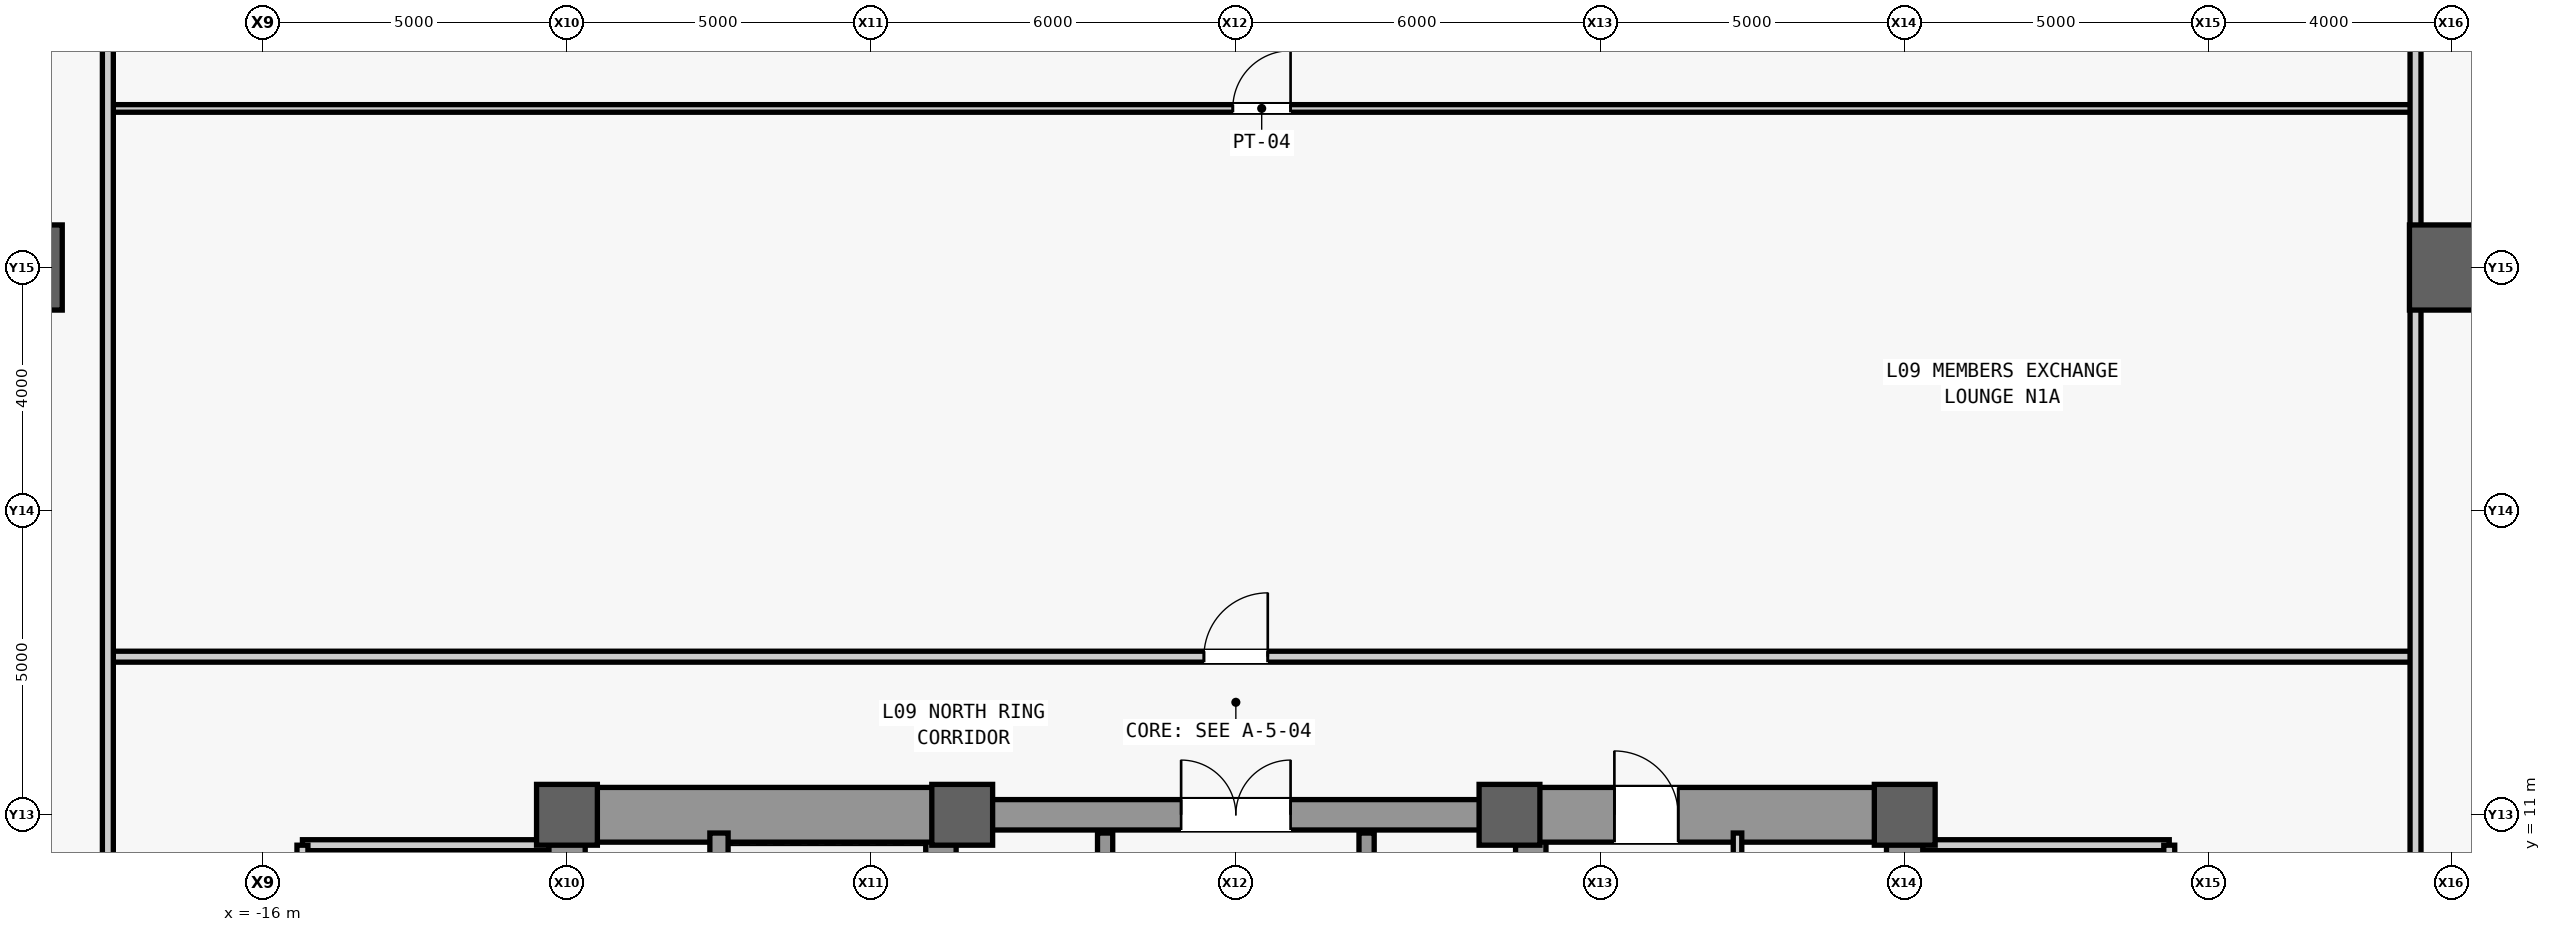
"""IFC4 building model, lengths in metres.
Left out: names, types, materials, properties, quantities, classifications, styles, units other than length and angle.
Written with IfcOpenShell. Run it as: python <this file> out.ifc"""

import sys

from ifc_helpers import new_model, si_unit, direction, frame, frame_2d, origin, origin_2d, place, context, subcontext, project, spatial, rectangle, hollow_rectangle, extrude, source, transform, mapped, element, fill, save


model = new_model("IFC4")
c1 = context("Model", 3, precision=1e-05, world=origin(), true_north=direction((0.0, 1.0)))
c2 = subcontext(c1, "Body", "Model", "MODEL_VIEW")
j1 = project(units=[si_unit("LENGTHUNIT", "METRE"), si_unit("PLANEANGLEUNIT", "RADIAN")], contexts=[c1])
p1 = place(None, origin())
s1 = spatial("IfcSite", under=j1, at=p1, CompositionType="ELEMENT")
p2 = place(p1, origin())
s2 = spatial("IfcBuilding", under=s1, at=p2, CompositionType="ELEMENT")
p3 = place(p2, frame((0.0, 0.0, 45.2)))
s3 = spatial("IfcBuildingStorey", under=s2, at=p3, CompositionType="ELEMENT", Elevation=45.2)
m1 = source(origin(), c2, "Body", "SweptSolid", [
    extrude(rectangle(XDim=22.0, YDim=0.6, at=frame_2d((11.0, 0.0))), origin(), (0.0, 0.0, 1.0), 3.94),
])
p4 = place(p3, frame((-11.0, -11.0, 0.0), z_axis=(0.0, 0.0, 1.0), x_axis=(0.0, 1.0, 0.0)))
e1 = element("IfcWall", 1, at=p4, inside=s3, PredefinedType="SHEAR", context=c2, shape_type="MappedRepresentation", body=[
    mapped(m1, transform((0.0, 0.0, 0.0), scale=1.0)),
])
m2 = source(origin(), c2, "Body", "SweptSolid", [
    extrude(rectangle(XDim=1.1, YDim=2.2, at=frame_2d((0.55, 1.1))), frame((0.0, 0.31, 0.0), z_axis=(0.0, -1.0, 0.0), x_axis=(1.0, 0.0, 0.0)), (0.0, 0.0, 1.0), 0.62),
])
p5 = place(p4, frame((0.8, 0.0, 0.0)))
e2 = element("IfcOpeningElement", 2, at=p5, cuts=e1, PredefinedType="OPENING", context=c2, shape_type="MappedRepresentation", body=[
    mapped(m2, transform((0.0, 0.0, 0.0), scale=1.0)),
])
p6 = place(p4, frame((12.5, 0.0, 0.0)))
e3 = element("IfcOpeningElement", 3, at=p6, cuts=e1, PredefinedType="OPENING", context=c2, shape_type="MappedRepresentation", body=[
    mapped(m2, transform((0.0, 0.0, 0.0), scale=1.0)),
])
m3 = source(origin(), c2, "Body", "SweptSolid", [
    extrude(rectangle(XDim=0.9, YDim=2.15, at=frame_2d((0.45, 1.075))), frame((0.0, 0.31, 0.0), z_axis=(0.0, -1.0, 0.0), x_axis=(1.0, 0.0, 0.0)), (0.0, 0.0, 1.0), 0.62),
])
p7 = place(p4, frame((6.2, 0.0, 0.0)))
e4 = element("IfcOpeningElement", 4, at=p7, cuts=e1, PredefinedType="OPENING", context=c2, shape_type="MappedRepresentation", body=[
    mapped(m3, transform((0.0, 0.0, 0.0), scale=1.0)),
])
p8 = place(p4, frame((8.05, 0.0, 0.0)))
e5 = element("IfcOpeningElement", 5, at=p8, cuts=e1, PredefinedType="OPENING", context=c2, shape_type="MappedRepresentation", body=[
    mapped(m3, transform((0.0, 0.0, 0.0), scale=1.0)),
])
m4 = source(origin(), c2, "Body", "SweptSolid", [
    extrude(rectangle(XDim=1.3, YDim=2.3, at=frame_2d((0.65, 1.15))), frame((0.0, 0.31, 0.0), z_axis=(0.0, -1.0, 0.0), x_axis=(1.0, 0.0, 0.0)), (0.0, 0.0, 1.0), 0.62),
])
p9 = place(p4, frame((2.7, 0.0, 0.0)))
e6 = element("IfcOpeningElement", 6, at=p9, cuts=e1, PredefinedType="OPENING", context=c2, shape_type="MappedRepresentation", body=[
    mapped(m4, transform((0.0, 0.0, 0.0), scale=1.0)),
])
p10 = place(p3, frame((11.0, -11.0, 0.0), z_axis=(0.0, 0.0, 1.0), x_axis=(0.0, 1.0, 0.0)))
e7 = element("IfcWall", 7, at=p10, inside=s3, PredefinedType="SHEAR", context=c2, shape_type="MappedRepresentation", body=[
    mapped(m1, transform((0.0, 0.0, 0.0), scale=1.0)),
])
p11 = place(p10, frame((0.8, 0.0, 0.0)))
e8 = element("IfcOpeningElement", 8, at=p11, cuts=e7, PredefinedType="OPENING", context=c2, shape_type="MappedRepresentation", body=[
    mapped(m2, transform((0.0, 0.0, 0.0), scale=1.0)),
])
p12 = place(p10, frame((6.85, 0.0, 0.0)))
e9 = element("IfcOpeningElement", 9, at=p12, cuts=e7, PredefinedType="OPENING", context=c2, shape_type="MappedRepresentation", body=[
    mapped(m3, transform((0.0, 0.0, 0.0), scale=1.0)),
])
p13 = place(p10, frame((2.7, 0.0, 0.0)))
e10 = element("IfcOpeningElement", 10, at=p13, cuts=e7, PredefinedType="OPENING", context=c2, shape_type="MappedRepresentation", body=[
    mapped(m4, transform((0.0, 0.0, 0.0), scale=1.0)),
])
p14 = place(p10, frame((13.35, 0.0, 0.0)))
e11 = element("IfcOpeningElement", 11, at=p14, cuts=e7, PredefinedType="OPENING", context=c2, shape_type="MappedRepresentation", body=[
    mapped(m4, transform((0.0, 0.0, 0.0), scale=1.0)),
])
m5 = source(origin(), c2, "Body", "SweptSolid", [
    extrude(rectangle(XDim=21.4, YDim=0.5, at=frame_2d((10.7, 0.0))), origin(), (0.0, 0.0, 1.0), 3.94),
])
for number, where, z_axis, x_axis in (
    (12, (-4.85, -10.7, 0.0), (0.0, 0.0, 1.0), (0.0, 1.0, 0.0)),
    (13, (4.85, -10.7, 0.0), (0.0, 0.0, 1.0), (0.0, 1.0, 0.0)),
):
    element("IfcWall", number, at=place(p3, frame(where, z_axis=z_axis, x_axis=x_axis)), inside=s3, PredefinedType="SHEAR", context=c2, shape_type="MappedRepresentation", body=[
        mapped(m5, transform((0.0, 0.0, 0.0), scale=1.0)),
    ])
m6 = source(origin(), c2, "Body", "SweptSolid", [
    extrude(rectangle(XDim=5.85, YDim=0.9, at=frame_2d((2.925, 0.0))), origin(), (0.0, 0.0, 1.0), 3.94),
])
p15 = place(p3, frame((-10.7, 11.0, 0.0), z_axis=(0.0, 0.0, 1.0), x_axis=(1.0, 0.0, 0.0)))
e14 = element("IfcWall", 14, at=p15, inside=s3, PredefinedType="SHEAR", context=c2, shape_type="MappedRepresentation", body=[
    mapped(m6, transform((0.0, 0.0, 0.0), scale=1.0)),
])
p16 = place(p3, frame((4.85, 11.0, 0.0), z_axis=(0.0, 0.0, 1.0), x_axis=(1.0, 0.0, 0.0)))
e15 = element("IfcWall", 15, at=p16, inside=s3, PredefinedType="SHEAR", context=c2, shape_type="MappedRepresentation", body=[
    mapped(m6, transform((0.0, 0.0, 0.0), scale=1.0)),
])
m7 = source(origin(), c2, "Body", "SweptSolid", [
    extrude(rectangle(XDim=1.05, YDim=2.2, at=frame_2d((0.525, 1.1))), frame((0.0, 0.46, 0.0), z_axis=(0.0, -1.0, 0.0), x_axis=(1.0, 0.0, 0.0)), (0.0, 0.0, 1.0), 0.92),
])
p17 = place(p16, frame((1.375, 0.0, 0.0)))
e16 = element("IfcOpeningElement", 16, at=p17, cuts=e15, PredefinedType="OPENING", context=c2, shape_type="MappedRepresentation", body=[
    mapped(m7, transform((0.0, 0.0, 0.0), scale=1.0)),
])
m8 = source(origin(), c2, "Body", "SweptSolid", [
    extrude(rectangle(XDim=9.2, YDim=0.5, at=frame_2d((4.6, 0.0))), origin(), (0.0, 0.0, 1.0), 3.94),
])
p18 = place(p3, frame((-4.6, 11.0, 0.0), z_axis=(0.0, 0.0, 1.0), x_axis=(1.0, 0.0, 0.0)))
e17 = element("IfcWall", 17, at=p18, inside=s3, PredefinedType="SHEAR", context=c2, shape_type="MappedRepresentation", body=[
    mapped(m8, transform((0.0, 0.0, 0.0), scale=1.0)),
])
m9 = source(origin(), c2, "Body", "SweptSolid", [
    extrude(rectangle(XDim=1.8, YDim=2.25, at=frame_2d((0.9, 1.125))), frame((0.0, 0.26, 0.0), z_axis=(0.0, -1.0, 0.0), x_axis=(1.0, 0.0, 0.0)), (0.0, 0.0, 1.0), 0.52),
])
p19 = place(p18, frame((3.7, 0.0, 0.0)))
e18 = element("IfcOpeningElement", 18, at=p19, cuts=e17, PredefinedType="OPENING", context=c2, shape_type="MappedRepresentation", body=[
    mapped(m9, transform((0.0, 0.0, 0.0), scale=1.0)),
])
m10 = source(origin(), c2, "Body", "SweptSolid", [
    extrude(hollow_rectangle(XDim=1.4, YDim=1.4, WallThickness=0.075, at=origin_2d()), origin(), (0.0, 0.0, 1.0), 4.2),
])
p20 = place(p3, frame((-20.0, 20.0, 0.0), z_axis=(0.0, 0.0, 1.0), x_axis=(1.0, 0.0, 0.0)))
e19 = element("IfcColumn", 19, at=p20, inside=s3, PredefinedType="COLUMN", context=c2, shape_type="MappedRepresentation", body=[
    mapped(m10, transform((0.0, 0.0, 0.0), scale=1.0)),
])
m11 = source(origin(), c2, "Body", "SweptSolid", [
    extrude(rectangle(XDim=1.0, YDim=1.0, at=origin_2d()), origin(), (0.0, 0.0, 1.0), 4.2),
])
for number, where, z_axis, x_axis in (
    (20, (-11.0, 11.0, 0.0), (0.0, 0.0, 1.0), (1.0, 0.0, 0.0)),
    (21, (-4.5, 11.0, 0.0), (0.0, 0.0, 1.0), (1.0, 0.0, 0.0)),
    (22, (4.5, 11.0, 0.0), (0.0, 0.0, 1.0), (1.0, 0.0, 0.0)),
    (23, (11.0, 11.0, 0.0), (0.0, 0.0, 1.0), (1.0, 0.0, 0.0)),
):
    element("IfcColumn", number, at=place(p3, frame(where, z_axis=z_axis, x_axis=x_axis)), inside=s3, PredefinedType="COLUMN", context=c2, shape_type="MappedRepresentation", body=[
        mapped(m11, transform((0.0, 0.0, 0.0), scale=1.0)),
    ])
p21 = place(p3, frame((20.0, 20.0, 0.0), z_axis=(0.0, 0.0, 1.0), x_axis=(1.0, 0.0, 0.0)))
e24 = element("IfcColumn", 24, at=p21, inside=s3, PredefinedType="COLUMN", context=c2, shape_type="MappedRepresentation", body=[
    mapped(m10, transform((0.0, 0.0, 0.0), scale=1.0)),
])
m12 = source(origin(), c2, "Body", "SweptSolid", [
    extrude(rectangle(XDim=7.75, YDim=0.3, at=frame_2d((3.875, 0.0))), origin(), (0.0, 0.0, 1.0), 3.94),
])
p22 = place(p3, frame((-8.5, 2.95, 0.0), z_axis=(0.0, 0.0, 1.0), x_axis=(0.0, 1.0, 0.0)))
e25 = element("IfcWall", 25, at=p22, inside=s3, PredefinedType="SHEAR", context=c2, shape_type="MappedRepresentation", body=[
    mapped(m12, transform((0.0, 0.0, 0.0), scale=1.0)),
])
m13 = source(origin(), c2, "Body", "SweptSolid", [
    extrude(rectangle(XDim=9.4, YDim=0.14, at=frame_2d((4.7, 0.0))), origin(), (0.0, 0.0, 1.0), 3.94),
])
p23 = place(p3, frame((8.25, 1.3, 0.0), z_axis=(0.0, 0.0, 1.0), x_axis=(0.0, 1.0, 0.0)))
e26 = element("IfcWall", 26, at=p23, inside=s3, PredefinedType="PARTITIONING", context=c2, shape_type="MappedRepresentation", body=[
    mapped(m13, transform((0.0, 0.0, 0.0), scale=1.0)),
])
m14 = source(origin(), c2, "Body", "SweptSolid", [
    extrude(rectangle(XDim=4.05, YDim=0.18, at=frame_2d((2.025, 0.0))), origin(), (0.0, 0.0, 1.0), 3.94),
])
p24 = place(p3, frame((-15.35, 10.5, 0.0), z_axis=(0.0, 0.0, 1.0), x_axis=(1.0, 0.0, 0.0)))
e27 = element("IfcWall", 27, at=p24, inside=s3, PredefinedType="PARTITIONING", context=c2, shape_type="MappedRepresentation", body=[
    mapped(m14, transform((0.0, 0.0, 0.0), scale=1.0)),
])
m15 = source(origin(), c2, "Body", "SweptSolid", [
    extrude(rectangle(XDim=16.6, YDim=0.18, at=frame_2d((8.3, 0.0))), origin(), (0.0, 0.0, 1.0), 3.94),
])
p25 = place(p3, frame((-15.35, -6.1, 0.0), z_axis=(0.0, 0.0, 1.0), x_axis=(0.0, 1.0, 0.0)))
e28 = element("IfcWall", 28, at=p25, inside=s3, PredefinedType="PARTITIONING", context=c2, shape_type="MappedRepresentation", body=[
    mapped(m15, transform((0.0, 0.0, 0.0), scale=1.0)),
])
m16 = source(origin(), c2, "Body", "SweptSolid", [
    extrude(rectangle(XDim=1.8, YDim=2.25, at=frame_2d((0.9, 1.125))), frame((0.0, 0.1, 0.0), z_axis=(0.0, -1.0, 0.0), x_axis=(1.0, 0.0, 0.0)), (0.0, 0.0, 1.0), 0.2),
])
p26 = place(p25, frame((2.7, 0.0, 0.0)))
e29 = element("IfcOpeningElement", 29, at=p26, cuts=e28, PredefinedType="OPENING", context=c2, shape_type="MappedRepresentation", body=[
    mapped(m16, transform((0.0, 0.0, 0.0), scale=1.0)),
])
p27 = place(p25, frame((11.0, 0.0, 0.0)))
e30 = element("IfcOpeningElement", 30, at=p27, cuts=e28, PredefinedType="OPENING", context=c2, shape_type="MappedRepresentation", body=[
    mapped(m16, transform((0.0, 0.0, 0.0), scale=1.0)),
])
p28 = place(p3, frame((11.3, 10.5, 0.0), z_axis=(0.0, 0.0, 1.0), x_axis=(1.0, 0.0, 0.0)))
e31 = element("IfcWall", 31, at=p28, inside=s3, PredefinedType="PARTITIONING", context=c2, shape_type="MappedRepresentation", body=[
    mapped(m14, transform((0.0, 0.0, 0.0), scale=1.0)),
])
p29 = place(p3, frame((15.35, -6.1, 0.0), z_axis=(0.0, 0.0, 1.0), x_axis=(0.0, 1.0, 0.0)))
e32 = element("IfcWall", 32, at=p29, inside=s3, PredefinedType="PARTITIONING", context=c2, shape_type="MappedRepresentation", body=[
    mapped(m15, transform((0.0, 0.0, 0.0), scale=1.0)),
])
p30 = place(p29, frame((2.7, 0.0, 0.0)))
e33 = element("IfcOpeningElement", 33, at=p30, cuts=e32, PredefinedType="OPENING", context=c2, shape_type="MappedRepresentation", body=[
    mapped(m16, transform((0.0, 0.0, 0.0), scale=1.0)),
])
p31 = place(p29, frame((13.0, 0.0, 0.0)))
e34 = element("IfcOpeningElement", 34, at=p31, cuts=e32, PredefinedType="OPENING", context=c2, shape_type="MappedRepresentation", body=[
    mapped(m16, transform((0.0, 0.0, 0.0), scale=1.0)),
])
m17 = source(origin(), c2, "Body", "SweptSolid", [
    extrude(rectangle(XDim=5.4, YDim=0.25, at=frame_2d((2.7, 0.0))), origin(), (0.0, 0.0, 1.0), 3.94),
])
for number, where, z_axis, x_axis in (
    (35, (-2.15, 5.3, 0.0), (0.0, 0.0, 1.0), (0.0, 1.0, 0.0)),
    (36, (2.15, 5.3, 0.0), (0.0, 0.0, 1.0), (0.0, 1.0, 0.0)),
):
    element("IfcWall", number, at=place(p3, frame(where, z_axis=z_axis, x_axis=x_axis)), inside=s3, PredefinedType="SHEAR", context=c2, shape_type="MappedRepresentation", body=[
        mapped(m17, transform((0.0, 0.0, 0.0), scale=1.0)),
    ])
m18 = source(origin(), c2, "Body", "SweptSolid", [
    extrude(rectangle(XDim=37.95, YDim=0.125, at=frame_2d((18.975, 0.0))), origin(), (0.0, 0.0, 1.0), 3.94),
])
p32 = place(p3, frame((-18.55, 22.616, 0.0), z_axis=(0.0, 0.0, 1.0), x_axis=(1.0, 0.0, 0.0)))
e37 = element("IfcWall", 37, at=p32, inside=s3, PredefinedType="PARTITIONING", context=c2, shape_type="MappedRepresentation", body=[
    mapped(m18, transform((0.0, 0.0, 0.0), scale=1.0)),
])
m19 = source(origin(), c2, "Body", "SweptSolid", [
    extrude(rectangle(XDim=0.95, YDim=2.15, at=frame_2d((0.475, 1.075))), frame((0.0, 0.073, 0.0), z_axis=(0.0, -1.0, 0.0), x_axis=(1.0, 0.0, 0.0)), (0.0, 0.0, 1.0), 0.145),
])
p33 = place(p32, frame((18.5, 0.0, 0.0)))
e38 = element("IfcOpeningElement", 38, at=p33, cuts=e37, PredefinedType="OPENING", context=c2, shape_type="MappedRepresentation", body=[
    mapped(m19, transform((0.0, 0.0, 0.0), scale=1.0)),
])
m20 = source(origin(), c2, "Body", "SweptSolid", [
    extrude(rectangle(XDim=37.95, YDim=0.18, at=frame_2d((18.975, 0.0))), origin(), (0.0, 0.0, 1.0), 3.94),
])
p34 = place(p3, frame((-18.55, 13.6, 0.0), z_axis=(0.0, 0.0, 1.0), x_axis=(1.0, 0.0, 0.0)))
e39 = element("IfcWall", 39, at=p34, inside=s3, PredefinedType="PARTITIONING", context=c2, shape_type="MappedRepresentation", body=[
    mapped(m20, transform((0.0, 0.0, 0.0), scale=1.0)),
])
m21 = source(origin(), c2, "Body", "SweptSolid", [
    extrude(rectangle(XDim=1.05, YDim=2.2, at=frame_2d((0.525, 1.1))), frame((0.0, 0.1, 0.0), z_axis=(0.0, -1.0, 0.0), x_axis=(1.0, 0.0, 0.0)), (0.0, 0.0, 1.0), 0.2),
])
p35 = place(p34, frame((18.025, 0.0, 0.0)))
e40 = element("IfcOpeningElement", 40, at=p35, cuts=e39, PredefinedType="OPENING", context=c2, shape_type="MappedRepresentation", body=[
    mapped(m21, transform((0.0, 0.0, 0.0), scale=1.0)),
])
m22 = source(origin(), c2, "Body", "SweptSolid", [
    extrude(rectangle(XDim=57.0, YDim=0.18, at=frame_2d((28.5, 0.0))), origin(), (0.0, 0.0, 1.0), 3.94),
])
p36 = place(p3, frame((-18.55, -28.5, 0.0), z_axis=(0.0, 0.0, 1.0), x_axis=(0.0, 1.0, 0.0)))
e41 = element("IfcWall", 41, at=p36, inside=s3, PredefinedType="PARTITIONING", context=c2, shape_type="MappedRepresentation", body=[
    mapped(m22, transform((0.0, 0.0, 0.0), scale=1.0)),
])
m23 = source(origin(), c2, "Body", "SweptSolid", [
    extrude(rectangle(XDim=0.95, YDim=2.15, at=frame_2d((0.475, 1.075))), frame((0.0, 0.1, 0.0), z_axis=(0.0, -1.0, 0.0), x_axis=(1.0, 0.0, 0.0)), (0.0, 0.0, 1.0), 0.2),
])
p37 = place(p36, frame((18.615, 0.0, 0.0)))
e42 = element("IfcOpeningElement", 42, at=p37, cuts=e41, PredefinedType="OPENING", context=c2, shape_type="MappedRepresentation", body=[
    mapped(m23, transform((0.0, 0.0, 0.0), scale=1.0)),
])
p38 = place(p36, frame((27.472, 0.0, 0.0)))
e43 = element("IfcOpeningElement", 43, at=p38, cuts=e41, PredefinedType="OPENING", context=c2, shape_type="MappedRepresentation", body=[
    mapped(m23, transform((0.0, 0.0, 0.0), scale=1.0)),
])
p39 = place(p36, frame((36.607, 0.0, 0.0)))
e44 = element("IfcOpeningElement", 44, at=p39, cuts=e41, PredefinedType="OPENING", context=c2, shape_type="MappedRepresentation", body=[
    mapped(m23, transform((0.0, 0.0, 0.0), scale=1.0)),
])
m24 = source(origin(), c2, "Body", "SweptSolid", [
    extrude(rectangle(XDim=57.0, YDim=0.18, at=frame_2d((28.5, 0.0))), origin(), (0.0, 0.0, 1.0), 3.471),
])
p40 = place(p3, frame((19.4, -28.5, 0.0), z_axis=(0.0, 0.0, 1.0), x_axis=(0.0, 1.0, 0.0)))
e45 = element("IfcWall", 45, at=p40, inside=s3, PredefinedType="PARTITIONING", context=c2, shape_type="MappedRepresentation", body=[
    mapped(m24, transform((0.0, 0.0, 0.0), scale=1.0)),
])
p41 = place(p40, frame((27.75, 0.0, 0.0)))
e46 = element("IfcOpeningElement", 46, at=p41, cuts=e45, PredefinedType="OPENING", context=c2, shape_type="MappedRepresentation", body=[
    mapped(m23, transform((0.0, 0.0, 0.0), scale=1.0)),
])
m25 = source(origin(), c2, "Body", "SweptSolid", [
    extrude(rectangle(XDim=1.05, YDim=2.2, at=frame_2d((0.525, 1.1))), frame((0.0, 0.025, 0.0), z_axis=(0.0, -1.0, 0.0), x_axis=(1.0, 0.0, 0.0)), (0.0, 0.0, 1.0), 0.05),
])
p42 = place(p17, origin())
e47 = element("IfcDoor", 47, at=p42, inside=s3, OperationType="SINGLE_SWING_LEFT", PredefinedType="DOOR", context=c2, shape_type="MappedRepresentation", body=[
    mapped(m25, transform((0.0, 0.0, 0.0), scale=1.0)),
])
fill(e16, e47)
m26 = source(origin(), c2, "Body", "SweptSolid", [
    extrude(rectangle(XDim=1.8, YDim=2.25, at=frame_2d((0.9, 1.125))), frame((0.0, 0.025, 0.0), z_axis=(0.0, -1.0, 0.0), x_axis=(1.0, 0.0, 0.0)), (0.0, 0.0, 1.0), 0.05),
])
p43 = place(p19, origin())
e48 = element("IfcDoor", 48, at=p43, inside=s3, OperationType="SINGLE_SWING_RIGHT", PredefinedType="DOOR", context=c2, shape_type="MappedRepresentation", body=[
    mapped(m26, transform((0.0, 0.0, 0.0), scale=1.0)),
])
fill(e18, e48)
m27 = source(origin(), c2, "Body", "SweptSolid", [
    extrude(rectangle(XDim=0.95, YDim=2.15, at=frame_2d((0.475, 1.075))), frame((0.0, 0.025, 0.0), z_axis=(0.0, -1.0, 0.0), x_axis=(1.0, 0.0, 0.0)), (0.0, 0.0, 1.0), 0.05),
])
p44 = place(p33, origin())
e49 = element("IfcDoor", 49, at=p44, inside=s3, OperationType="SINGLE_SWING_RIGHT", PredefinedType="DOOR", context=c2, shape_type="MappedRepresentation", body=[
    mapped(m27, transform((0.0, 0.0, 0.0), scale=1.0)),
])
fill(e38, e49)
p45 = place(p35, origin())
e50 = element("IfcDoor", 50, at=p45, inside=s3, OperationType="SINGLE_SWING_RIGHT", PredefinedType="DOOR", context=c2, shape_type="MappedRepresentation", body=[
    mapped(m25, transform((0.0, 0.0, 0.0), scale=1.0)),
])
fill(e40, e50)
save(model, sys.argv[1])
